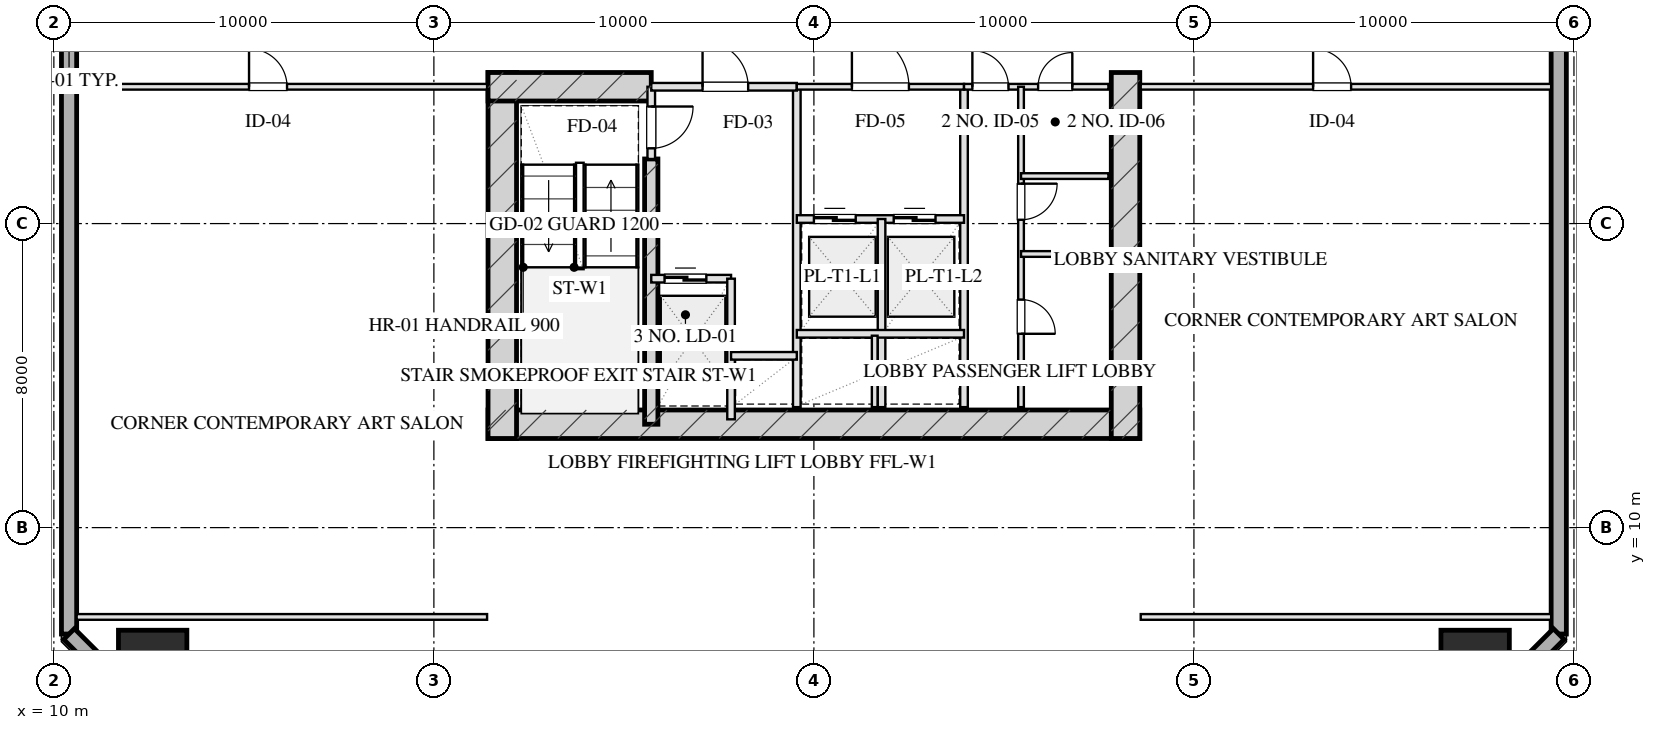
"""IFC4 building model, lengths in metres.
Left out: names, types, materials, properties, quantities, classifications, styles, units other than length and angle.
Written with IfcOpenShell. Run it as: python <this file> out.ifc"""

import sys

from ifc_helpers import new_model, si_unit, direction, frame, frame_2d, origin, origin_2d, place, context, subcontext, project, spatial, rectangle, hollow_rectangle, extrude, element, fill, save


model = new_model("IFC4")
c1 = context("Model", 3, precision=1e-05, world=origin(), true_north=direction((0.0, 1.0)))
c2 = subcontext(c1, "Body", "Model", "MODEL_VIEW")
j1 = project(units=[si_unit("LENGTHUNIT", "METRE"), si_unit("PLANEANGLEUNIT", "RADIAN")], contexts=[c1])
p1 = place(None, origin())
s1 = spatial("IfcSite", under=j1, at=p1, CompositionType="ELEMENT")
p2 = place(p1, origin())
s2 = spatial("IfcBuilding", under=s1, at=p2, CompositionType="ELEMENT")
p3 = place(p2, frame((0.0, 0.0, 57.5)))
s3 = spatial("IfcBuildingStorey", under=s2, at=p3, CompositionType="ELEMENT", Elevation=57.5)
p4 = place(p3, frame((21.425, 12.72, 0.0), z_axis=(0.0, 0.0, 1.0), x_axis=(1.0, 0.0, 0.0)))
e1 = element("IfcWall", 1, at=p4, inside=s3, PredefinedType="SHEAR", context=c2, shape_type="SweptSolid", body=[
    extrude(rectangle(XDim=17.15, YDim=0.75, at=frame_2d((8.575, 0.0))), origin(), (0.0, 0.0, 1.0), 3.45),
])
for number, where, z_axis, x_axis in (
    (2, (21.8, 21.975, 0.0), (0.0, 0.0, 1.0), (0.0, -1.0, 0.0)),
    (3, (38.2, 21.975, 0.0), (0.0, 0.0, 1.0), (0.0, -1.0, 0.0)),
):
    element("IfcWall", number, at=place(p3, frame(where, z_axis=z_axis, x_axis=x_axis)), inside=s3, PredefinedType="SHEAR", context=c2, shape_type="SweptSolid", body=[
        extrude(rectangle(XDim=9.63, YDim=0.75, at=frame_2d((4.815, 0.0))), origin(), (0.0, 0.0, 1.0), 3.45),
    ])
p5 = place(p3, frame((25.72, 19.7, 0.0), z_axis=(0.0, 0.0, 1.0), x_axis=(0.0, -1.0, 0.0)))
e4 = element("IfcWall", 4, at=p5, inside=s3, PredefinedType="SHEAR", context=c2, shape_type="SweptSolid", body=[
    extrude(rectangle(XDim=6.98, YDim=0.35, at=frame_2d((3.49, 0.0))), origin(), (0.0, 0.0, 1.0), 3.45),
])
p6 = place(p3, frame((21.425, 21.6, 0.0), z_axis=(0.0, 0.0, 1.0), x_axis=(1.0, 0.0, 0.0)))
e5 = element("IfcWall", 5, at=p6, inside=s3, PredefinedType="SHEAR", context=c2, shape_type="SweptSolid", body=[
    extrude(rectangle(XDim=4.295, YDim=0.75, at=frame_2d((2.147, 0.0))), origin(), (0.0, 0.0, 1.0), 3.45),
])
for number, where, z_axis, x_axis in (
    (6, (12.6, 6.4, 0.0), (0.0, 0.0, 1.0), (1.0, 0.0, 0.0)),
    (7, (47.4, 6.4, 0.0), (0.0, 0.0, 1.0), (1.0, 0.0, 0.0)),
):
    element("IfcColumn", number, at=place(p3, frame(where, z_axis=z_axis, x_axis=x_axis)), inside=s3, PredefinedType="COLUMN", context=c2, shape_type="SweptSolid", body=[
        extrude(hollow_rectangle(XDim=1.8, YDim=1.8, WallThickness=0.06, at=origin_2d()), origin(), (0.0, 0.0, 1.0), 3.451),
    ])
p7 = place(p3, frame((10.4, 7.2, 0.0), z_axis=(0.0, 0.0, 1.0), x_axis=(0.0, 1.0, 0.0)))
e8 = element("IfcWall", 8, at=p7, inside=s3, PredefinedType="SOLIDWALL", context=c2, shape_type="SweptSolid", body=[
    extrude(rectangle(XDim=53.6, YDim=0.4, at=frame_2d((26.8, 0.0))), origin(), (0.0, 0.0, 1.0), 2.61),
])
p8 = place(p7, frame((19.15, 0.0, 0.75)))
e9 = element("IfcOpeningElement", 9, at=p8, cuts=e8, PredefinedType="OPENING", context=c2, shape_type="SweptSolid", body=[
    extrude(rectangle(XDim=2.5, YDim=1.46, at=frame_2d((1.25, 0.73))), frame((0.0, 0.21, 0.0), z_axis=(0.0, -1.0, 0.0), x_axis=(1.0, 0.0, 0.0)), (0.0, 0.0, 1.0), 0.42),
])
p9 = place(p7, frame((22.95, 0.0, 0.75)))
e10 = element("IfcOpeningElement", 10, at=p9, cuts=e8, PredefinedType="OPENING", context=c2, shape_type="SweptSolid", body=[
    extrude(rectangle(XDim=2.5, YDim=1.46, at=frame_2d((1.25, 0.73))), frame((0.0, 0.21, 0.0), z_axis=(0.0, -1.0, 0.0), x_axis=(1.0, 0.0, 0.0)), (0.0, 0.0, 1.0), 0.42),
])
p10 = place(p7, frame((32.05, 0.0, 0.0)))
e11 = element("IfcOpeningElement", 11, at=p10, cuts=e8, PredefinedType="OPENING", context=c2, shape_type="SweptSolid", body=[
    extrude(rectangle(XDim=1.1, YDim=2.15, at=frame_2d((0.55, 1.075))), frame((0.0, 0.21, 0.0), z_axis=(0.0, -1.0, 0.0), x_axis=(1.0, 0.0, 0.0)), (0.0, 0.0, 1.0), 0.42),
])
p11 = place(p3, frame((49.6, 60.8, 0.0), z_axis=(0.0, 0.0, 1.0), x_axis=(0.0, -1.0, 0.0)))
e12 = element("IfcWall", 12, at=p11, inside=s3, PredefinedType="SOLIDWALL", context=c2, shape_type="SweptSolid", body=[
    extrude(rectangle(XDim=53.6, YDim=0.4, at=frame_2d((26.8, 0.0))), origin(), (0.0, 0.0, 1.0), 2.61),
])
p12 = place(p11, frame((23.177, 0.0, 0.0)))
e13 = element("IfcOpeningElement", 13, at=p12, cuts=e12, PredefinedType="OPENING", context=c2, shape_type="SweptSolid", body=[
    extrude(rectangle(XDim=1.1, YDim=2.15, at=frame_2d((0.55, 1.075))), frame((0.0, 0.21, 0.0), z_axis=(0.0, -1.0, 0.0), x_axis=(1.0, 0.0, 0.0)), (0.0, 0.0, 1.0), 0.42),
])
for number, where, z_axis, x_axis in (
    (14, (49.6, 7.2, 0.0), (0.0, 0.0, 1.0), (-0.707, -0.707, 0.0)),
    (15, (13.4, 4.2, 0.0), (0.0, 0.0, 1.0), (-0.707, 0.707, 0.0)),
):
    element("IfcWall", number, at=place(p3, frame(where, z_axis=z_axis, x_axis=x_axis)), inside=s3, PredefinedType="SOLIDWALL", context=c2, shape_type="SweptSolid", body=[
        extrude(rectangle(XDim=4.243, YDim=0.4, at=frame_2d((2.121, 0.0))), origin(), (0.0, 0.0, 1.0), 2.61),
    ])
p13 = place(p3, frame((25.72, 21.6, 0.0), z_axis=(0.0, 0.0, 1.0), x_axis=(0.0, -1.0, 0.0)))
e16 = element("IfcWall", 16, at=p13, inside=s3, PredefinedType="PARTITIONING", context=c2, shape_type="SweptSolid", body=[
    extrude(rectangle(XDim=1.9, YDim=0.2, at=frame_2d((0.95, 0.0))), origin(), (0.0, 0.0, 1.0), 3.175),
])
p14 = place(p13, frame((0.52, 0.0, 0.0)))
e17 = element("IfcOpeningElement", 17, at=p14, cuts=e16, PredefinedType="OPENING", context=c2, shape_type="SweptSolid", body=[
    extrude(rectangle(XDim=1.1, YDim=2.05, at=frame_2d((0.55, 1.025))), frame((0.0, 0.11, 0.0), z_axis=(0.0, -1.0, 0.0), x_axis=(1.0, 0.0, 0.0)), (0.0, 0.0, 1.0), 0.22),
])
p15 = place(p3, frame((29.55, 21.6, 0.0), z_axis=(0.0, 0.0, 1.0), x_axis=(0.0, -1.0, 0.0)))
e18 = element("IfcWall", 18, at=p15, inside=s3, PredefinedType="PARTITIONING", context=c2, shape_type="SweptSolid", body=[
    extrude(rectangle(XDim=8.43, YDim=0.2, at=frame_2d((4.215, 0.0))), origin(), (0.0, 0.0, 1.0), 3.175),
])
p16 = place(p3, frame((25.72, 21.6, 0.0), z_axis=(0.0, 0.0, 1.0), x_axis=(1.0, 0.0, 0.0)))
e19 = element("IfcWall", 19, at=p16, inside=s3, PredefinedType="PARTITIONING", context=c2, shape_type="SweptSolid", body=[
    extrude(rectangle(XDim=3.83, YDim=0.2, at=frame_2d((1.915, 0.0))), origin(), (0.0, 0.0, 1.0), 3.175),
])
p17 = place(p16, frame((1.35, 0.0, 0.0)))
e20 = element("IfcOpeningElement", 20, at=p17, cuts=e19, PredefinedType="OPENING", context=c2, shape_type="SweptSolid", body=[
    extrude(rectangle(XDim=1.2, YDim=2.05, at=frame_2d((0.6, 1.025))), frame((0.0, 0.11, 0.0), z_axis=(0.0, -1.0, 0.0), x_axis=(1.0, 0.0, 0.0)), (0.0, 0.0, 1.0), 0.22),
])
p18 = place(p3, frame((25.72, 16.55, 0.0), z_axis=(0.0, 0.0, 1.0), x_axis=(1.0, 0.0, 0.0)))
e21 = element("IfcWall", 21, at=p18, inside=s3, PredefinedType="PARTITIONING", context=c2, shape_type="SweptSolid", body=[
    extrude(rectangle(XDim=2.1, YDim=0.2, at=frame_2d((1.05, 0.0))), origin(), (0.0, 0.0, 1.0), 3.175),
])
p19 = place(p18, frame((0.35, 0.0, 0.0)))
e22 = element("IfcOpeningElement", 22, at=p19, cuts=e21, PredefinedType="OPENING", context=c2, shape_type="SweptSolid", body=[
    extrude(rectangle(XDim=1.1, YDim=2.05, at=frame_2d((0.55, 1.025))), frame((0.0, 0.11, 0.0), z_axis=(0.0, -1.0, 0.0), x_axis=(1.0, 0.0, 0.0)), (0.0, 0.0, 1.0), 0.22),
])
p20 = place(p3, frame((27.82, 16.55, 0.0), z_axis=(0.0, 0.0, 1.0), x_axis=(0.0, -1.0, 0.0)))
e23 = element("IfcWall", 23, at=p20, inside=s3, PredefinedType="PARTITIONING", context=c2, shape_type="SweptSolid", body=[
    extrude(rectangle(XDim=3.7, YDim=0.2, at=frame_2d((1.85, 0.0))), origin(), (0.0, 0.0, 1.0), 3.175),
])
p21 = place(p3, frame((27.82, 14.52, 0.0), z_axis=(0.0, 0.0, 1.0), x_axis=(1.0, 0.0, 0.0)))
e24 = element("IfcWall", 24, at=p21, inside=s3, PredefinedType="PARTITIONING", context=c2, shape_type="SweptSolid", body=[
    extrude(rectangle(XDim=1.73, YDim=0.2, at=frame_2d((0.865, 0.0))), origin(), (0.0, 0.0, 1.0), 3.175),
])
p22 = place(p3, frame((33.95, 21.6, 0.0), z_axis=(0.0, 0.0, 1.0), x_axis=(0.0, -1.0, 0.0)))
e25 = element("IfcWall", 25, at=p22, inside=s3, PredefinedType="PARTITIONING", context=c2, shape_type="SweptSolid", body=[
    extrude(rectangle(XDim=8.43, YDim=0.2, at=frame_2d((4.215, 0.0))), origin(), (0.0, 0.0, 1.0), 3.175),
])
p23 = place(p3, frame((29.55, 21.6, 0.0), z_axis=(0.0, 0.0, 1.0), x_axis=(1.0, 0.0, 0.0)))
e26 = element("IfcWall", 26, at=p23, inside=s3, PredefinedType="PARTITIONING", context=c2, shape_type="SweptSolid", body=[
    extrude(rectangle(XDim=4.4, YDim=0.15, at=frame_2d((2.2, 0.0))), origin(), (0.0, 0.0, 1.0), 3.175),
])
p24 = place(p23, frame((1.45, 0.0, 0.0)))
e27 = element("IfcOpeningElement", 27, at=p24, cuts=e26, PredefinedType="OPENING", context=c2, shape_type="SweptSolid", body=[
    extrude(rectangle(XDim=1.5, YDim=2.05, at=frame_2d((0.75, 1.025))), frame((0.0, 0.085, 0.0), z_axis=(0.0, -1.0, 0.0), x_axis=(1.0, 0.0, 0.0)), (0.0, 0.0, 1.0), 0.17),
])
p25 = place(p3, frame((29.55, 18.12, 0.0), z_axis=(0.0, 0.0, 1.0), x_axis=(1.0, 0.0, 0.0)))
e28 = element("IfcWall", 28, at=p25, inside=s3, PredefinedType="PARTITIONING", context=c2, shape_type="SweptSolid", body=[
    extrude(rectangle(XDim=4.4, YDim=0.2, at=frame_2d((2.2, 0.0))), origin(), (0.0, 0.0, 1.0), 3.175),
])
p26 = place(p25, frame((0.45, 0.0, 0.0)))
e29 = element("IfcOpeningElement", 29, at=p26, cuts=e28, PredefinedType="OPENING", context=c2, shape_type="SweptSolid", body=[
    extrude(rectangle(XDim=1.1, YDim=2.05, at=frame_2d((0.55, 1.025))), frame((0.0, 0.11, 0.0), z_axis=(0.0, -1.0, 0.0), x_axis=(1.0, 0.0, 0.0)), (0.0, 0.0, 1.0), 0.22),
])
p27 = place(p25, frame((2.55, 0.0, 0.0)))
e30 = element("IfcOpeningElement", 30, at=p27, cuts=e28, PredefinedType="OPENING", context=c2, shape_type="SweptSolid", body=[
    extrude(rectangle(XDim=1.1, YDim=2.05, at=frame_2d((0.55, 1.025))), frame((0.0, 0.11, 0.0), z_axis=(0.0, -1.0, 0.0), x_axis=(1.0, 0.0, 0.0)), (0.0, 0.0, 1.0), 0.22),
])
p28 = place(p3, frame((31.78, 18.12, 0.0), z_axis=(0.0, 0.0, 1.0), x_axis=(0.0, -1.0, 0.0)))
e31 = element("IfcWall", 31, at=p28, inside=s3, PredefinedType="PARTITIONING", context=c2, shape_type="SweptSolid", body=[
    extrude(rectangle(XDim=4.95, YDim=0.2, at=frame_2d((2.475, 0.0))), origin(), (0.0, 0.0, 1.0), 3.175),
])
p29 = place(p3, frame((29.55, 15.1, 0.0), z_axis=(0.0, 0.0, 1.0), x_axis=(1.0, 0.0, 0.0)))
e32 = element("IfcWall", 32, at=p29, inside=s3, PredefinedType="PARTITIONING", context=c2, shape_type="SweptSolid", body=[
    extrude(rectangle(XDim=4.4, YDim=0.2, at=frame_2d((2.2, 0.0))), origin(), (0.0, 0.0, 1.0), 3.175),
])
p30 = place(p3, frame((31.6, 15.05, 0.0), z_axis=(0.0, 0.0, 1.0), x_axis=(0.0, -1.0, 0.0)))
e33 = element("IfcWall", 33, at=p30, inside=s3, PredefinedType="PARTITIONING", context=c2, shape_type="SweptSolid", body=[
    extrude(rectangle(XDim=1.88, YDim=0.15, at=frame_2d((0.94, 0.0))), origin(), (0.0, 0.0, 1.0), 3.175),
])
p31 = place(p3, frame((33.95, 21.6, 0.0), z_axis=(0.0, 0.0, 1.0), x_axis=(1.0, 0.0, 0.0)))
e34 = element("IfcWall", 34, at=p31, inside=s3, PredefinedType="PARTITIONING", context=c2, shape_type="SweptSolid", body=[
    extrude(rectangle(XDim=3.8, YDim=0.15, at=frame_2d((1.9, 0.0))), origin(), (0.0, 0.0, 1.0), 3.175),
])
p32 = place(p31, frame((0.22, 0.0, 0.0)))
e35 = element("IfcOpeningElement", 35, at=p32, cuts=e34, PredefinedType="OPENING", context=c2, shape_type="SweptSolid", body=[
    extrude(rectangle(XDim=0.95, YDim=2.05, at=frame_2d((0.475, 1.025))), frame((0.0, 0.085, 0.0), z_axis=(0.0, -1.0, 0.0), x_axis=(1.0, 0.0, 0.0)), (0.0, 0.0, 1.0), 0.17),
])
p33 = place(p31, frame((1.95, 0.0, 0.0)))
e36 = element("IfcOpeningElement", 36, at=p33, cuts=e34, PredefinedType="OPENING", context=c2, shape_type="SweptSolid", body=[
    extrude(rectangle(XDim=0.9, YDim=2.05, at=frame_2d((0.45, 1.025))), frame((0.0, 0.085, 0.0), z_axis=(0.0, -1.0, 0.0), x_axis=(1.0, 0.0, 0.0)), (0.0, 0.0, 1.0), 0.17),
])
p34 = place(p3, frame((35.45, 21.6, 0.0), z_axis=(0.0, 0.0, 1.0), x_axis=(0.0, -1.0, 0.0)))
e37 = element("IfcWall", 37, at=p34, inside=s3, PredefinedType="PARTITIONING", context=c2, shape_type="SweptSolid", body=[
    extrude(rectangle(XDim=8.43, YDim=0.15, at=frame_2d((4.215, 0.0))), origin(), (0.0, 0.0, 1.0), 2.815),
])
p35 = place(p34, frame((2.55, 0.0, 0.0)))
e38 = element("IfcOpeningElement", 38, at=p35, cuts=e37, PredefinedType="OPENING", context=c2, shape_type="SweptSolid", body=[
    extrude(rectangle(XDim=0.95, YDim=2.05, at=frame_2d((0.475, 1.025))), frame((0.0, 0.085, 0.0), z_axis=(0.0, -1.0, 0.0), x_axis=(1.0, 0.0, 0.0)), (0.0, 0.0, 1.0), 0.17),
])
p36 = place(p34, frame((5.6, 0.0, 0.0)))
e39 = element("IfcOpeningElement", 39, at=p36, cuts=e37, PredefinedType="OPENING", context=c2, shape_type="SweptSolid", body=[
    extrude(rectangle(XDim=0.9, YDim=2.05, at=frame_2d((0.45, 1.025))), frame((0.0, 0.085, 0.0), z_axis=(0.0, -1.0, 0.0), x_axis=(1.0, 0.0, 0.0)), (0.0, 0.0, 1.0), 0.17),
])
for number, where, z_axis, x_axis in (
    (40, (35.45, 17.2, 0.0), (0.0, 0.0, 1.0), (1.0, 0.0, 0.0)),
    (41, (35.45, 19.25, 0.0), (0.0, 0.0, 1.0), (1.0, 0.0, 0.0)),
):
    element("IfcWall", number, at=place(p3, frame(where, z_axis=z_axis, x_axis=x_axis)), inside=s3, PredefinedType="PARTITIONING", context=c2, shape_type="SweptSolid", body=[
        extrude(rectangle(XDim=2.3, YDim=0.15, at=frame_2d((1.15, 0.0))), origin(), (0.0, 0.0, 1.0), 3.175),
    ])
p37 = place(p3, frame((10.6, 7.65, 0.0), z_axis=(0.0, 0.0, 1.0), x_axis=(1.0, 0.0, 0.0)))
e42 = element("IfcWall", 42, at=p37, inside=s3, PredefinedType="PARTITIONING", context=c2, shape_type="SweptSolid", body=[
    extrude(rectangle(XDim=10.8, YDim=0.15, at=frame_2d((5.4, 0.0))), origin(), (0.0, 0.0, 1.0), 3.175),
])
p38 = place(p3, frame((10.6, 21.6, 0.0), z_axis=(0.0, 0.0, 1.0), x_axis=(1.0, 0.0, 0.0)))
e43 = element("IfcWall", 43, at=p38, inside=s3, PredefinedType="PARTITIONING", context=c2, shape_type="SweptSolid", body=[
    extrude(rectangle(XDim=10.8, YDim=0.15, at=frame_2d((5.4, 0.0))), origin(), (0.0, 0.0, 1.0), 3.175),
])
p39 = place(p38, frame((4.536, 0.0, 0.0)))
e44 = element("IfcOpeningElement", 44, at=p39, cuts=e43, PredefinedType="OPENING", context=c2, shape_type="SweptSolid", body=[
    extrude(rectangle(XDim=1.0, YDim=2.05, at=frame_2d((0.5, 1.025))), frame((0.0, 0.085, 0.0), z_axis=(0.0, -1.0, 0.0), x_axis=(1.0, 0.0, 0.0)), (0.0, 0.0, 1.0), 0.17),
])
p40 = place(p3, frame((38.6, 7.65, 0.0), z_axis=(0.0, 0.0, 1.0), x_axis=(1.0, 0.0, 0.0)))
e45 = element("IfcWall", 45, at=p40, inside=s3, PredefinedType="PARTITIONING", context=c2, shape_type="SweptSolid", body=[
    extrude(rectangle(XDim=10.8, YDim=0.15, at=frame_2d((5.4, 0.0))), origin(), (0.0, 0.0, 1.0), 3.175),
])
p41 = place(p3, frame((38.6, 21.6, 0.0), z_axis=(0.0, 0.0, 1.0), x_axis=(1.0, 0.0, 0.0)))
e46 = element("IfcWall", 46, at=p41, inside=s3, PredefinedType="PARTITIONING", context=c2, shape_type="SweptSolid", body=[
    extrude(rectangle(XDim=10.8, YDim=0.15, at=frame_2d((5.4, 0.0))), origin(), (0.0, 0.0, 1.0), 3.175),
])
p42 = place(p41, frame((4.536, 0.0, 0.0)))
e47 = element("IfcOpeningElement", 47, at=p42, cuts=e46, PredefinedType="OPENING", context=c2, shape_type="SweptSolid", body=[
    extrude(rectangle(XDim=1.0, YDim=2.05, at=frame_2d((0.5, 1.025))), frame((0.0, 0.085, 0.0), z_axis=(0.0, -1.0, 0.0), x_axis=(1.0, 0.0, 0.0)), (0.0, 0.0, 1.0), 0.17),
])
p43 = place(p14, origin())
e48 = element("IfcDoor", 48, at=p43, inside=s3, OperationType="SINGLE_SWING_LEFT", PredefinedType="DOOR", context=c2, shape_type="SweptSolid", body=[
    extrude(rectangle(XDim=1.1, YDim=2.05, at=frame_2d((0.55, 1.025))), frame((0.0, 0.025, 0.0), z_axis=(0.0, -1.0, 0.0), x_axis=(1.0, 0.0, 0.0)), (0.0, 0.0, 1.0), 0.05),
])
fill(e17, e48)
p44 = place(p17, origin())
e49 = element("IfcDoor", 49, at=p44, inside=s3, OperationType="SINGLE_SWING_LEFT", PredefinedType="DOOR", context=c2, shape_type="SweptSolid", body=[
    extrude(rectangle(XDim=1.2, YDim=2.05, at=frame_2d((0.6, 1.025))), frame((0.0, 0.025, 0.0), z_axis=(0.0, -1.0, 0.0), x_axis=(1.0, 0.0, 0.0)), (0.0, 0.0, 1.0), 0.05),
])
fill(e20, e49)
p45 = place(p19, origin())
e50 = element("IfcDoor", 50, at=p45, inside=s3, OperationType="DOUBLE_DOOR_SLIDING", PredefinedType="DOOR", context=c2, shape_type="SweptSolid", body=[
    extrude(rectangle(XDim=1.1, YDim=2.05, at=frame_2d((0.55, 1.025))), frame((0.0, 0.025, 0.0), z_axis=(0.0, -1.0, 0.0), x_axis=(1.0, 0.0, 0.0)), (0.0, 0.0, 1.0), 0.05),
])
fill(e22, e50)
p46 = place(p24, origin())
e51 = element("IfcDoor", 51, at=p46, inside=s3, OperationType="SINGLE_SWING_LEFT", PredefinedType="DOOR", context=c2, shape_type="SweptSolid", body=[
    extrude(rectangle(XDim=1.5, YDim=2.05, at=frame_2d((0.75, 1.025))), frame((0.0, 0.025, 0.0), z_axis=(0.0, -1.0, 0.0), x_axis=(1.0, 0.0, 0.0)), (0.0, 0.0, 1.0), 0.05),
])
fill(e27, e51)
p47 = place(p26, origin())
e52 = element("IfcDoor", 52, at=p47, inside=s3, OperationType="DOUBLE_DOOR_SLIDING", PredefinedType="DOOR", context=c2, shape_type="SweptSolid", body=[
    extrude(rectangle(XDim=1.1, YDim=2.05, at=frame_2d((0.55, 1.025))), frame((0.0, 0.025, 0.0), z_axis=(0.0, -1.0, 0.0), x_axis=(1.0, 0.0, 0.0)), (0.0, 0.0, 1.0), 0.05),
])
fill(e29, e52)
p48 = place(p27, origin())
e53 = element("IfcDoor", 53, at=p48, inside=s3, OperationType="DOUBLE_DOOR_SLIDING", PredefinedType="DOOR", context=c2, shape_type="SweptSolid", body=[
    extrude(rectangle(XDim=1.1, YDim=2.05, at=frame_2d((0.55, 1.025))), frame((0.0, 0.025, 0.0), z_axis=(0.0, -1.0, 0.0), x_axis=(1.0, 0.0, 0.0)), (0.0, 0.0, 1.0), 0.05),
])
fill(e30, e53)
p49 = place(p32, origin())
e54 = element("IfcDoor", 54, at=p49, inside=s3, OperationType="SINGLE_SWING_LEFT", PredefinedType="DOOR", context=c2, shape_type="SweptSolid", body=[
    extrude(rectangle(XDim=0.95, YDim=2.05, at=frame_2d((0.475, 1.025))), frame((0.0, 0.025, 0.0), z_axis=(0.0, -1.0, 0.0), x_axis=(1.0, 0.0, 0.0)), (0.0, 0.0, 1.0), 0.05),
])
fill(e35, e54)
p50 = place(p33, origin())
e55 = element("IfcDoor", 55, at=p50, inside=s3, OperationType="SINGLE_SWING_RIGHT", PredefinedType="DOOR", context=c2, shape_type="SweptSolid", body=[
    extrude(rectangle(XDim=0.9, YDim=2.05, at=frame_2d((0.45, 1.025))), frame((0.0, 0.025, 0.0), z_axis=(0.0, -1.0, 0.0), x_axis=(1.0, 0.0, 0.0)), (0.0, 0.0, 1.0), 0.05),
])
fill(e36, e55)
p51 = place(p35, origin())
e56 = element("IfcDoor", 56, at=p51, inside=s3, OperationType="SINGLE_SWING_LEFT", PredefinedType="DOOR", context=c2, shape_type="SweptSolid", body=[
    extrude(rectangle(XDim=0.95, YDim=2.05, at=frame_2d((0.475, 1.025))), frame((0.0, 0.025, 0.0), z_axis=(0.0, -1.0, 0.0), x_axis=(1.0, 0.0, 0.0)), (0.0, 0.0, 1.0), 0.05),
])
fill(e38, e56)
p52 = place(p36, origin())
e57 = element("IfcDoor", 57, at=p52, inside=s3, OperationType="SINGLE_SWING_RIGHT", PredefinedType="DOOR", context=c2, shape_type="SweptSolid", body=[
    extrude(rectangle(XDim=0.9, YDim=2.05, at=frame_2d((0.45, 1.025))), frame((0.0, 0.025, 0.0), z_axis=(0.0, -1.0, 0.0), x_axis=(1.0, 0.0, 0.0)), (0.0, 0.0, 1.0), 0.05),
])
fill(e39, e57)
p53 = place(p39, origin())
e58 = element("IfcDoor", 58, at=p53, inside=s3, OperationType="SINGLE_SWING_LEFT", PredefinedType="DOOR", context=c2, shape_type="SweptSolid", body=[
    extrude(rectangle(XDim=1.0, YDim=2.05, at=frame_2d((0.5, 1.025))), frame((0.0, 0.025, 0.0), z_axis=(0.0, -1.0, 0.0), x_axis=(1.0, 0.0, 0.0)), (0.0, 0.0, 1.0), 0.05),
])
fill(e44, e58)
p54 = place(p42, origin())
e59 = element("IfcDoor", 59, at=p54, inside=s3, OperationType="SINGLE_SWING_LEFT", PredefinedType="DOOR", context=c2, shape_type="SweptSolid", body=[
    extrude(rectangle(XDim=1.0, YDim=2.05, at=frame_2d((0.5, 1.025))), frame((0.0, 0.025, 0.0), z_axis=(0.0, -1.0, 0.0), x_axis=(1.0, 0.0, 0.0)), (0.0, 0.0, 1.0), 0.05),
])
fill(e47, e59)
save(model, sys.argv[1])
